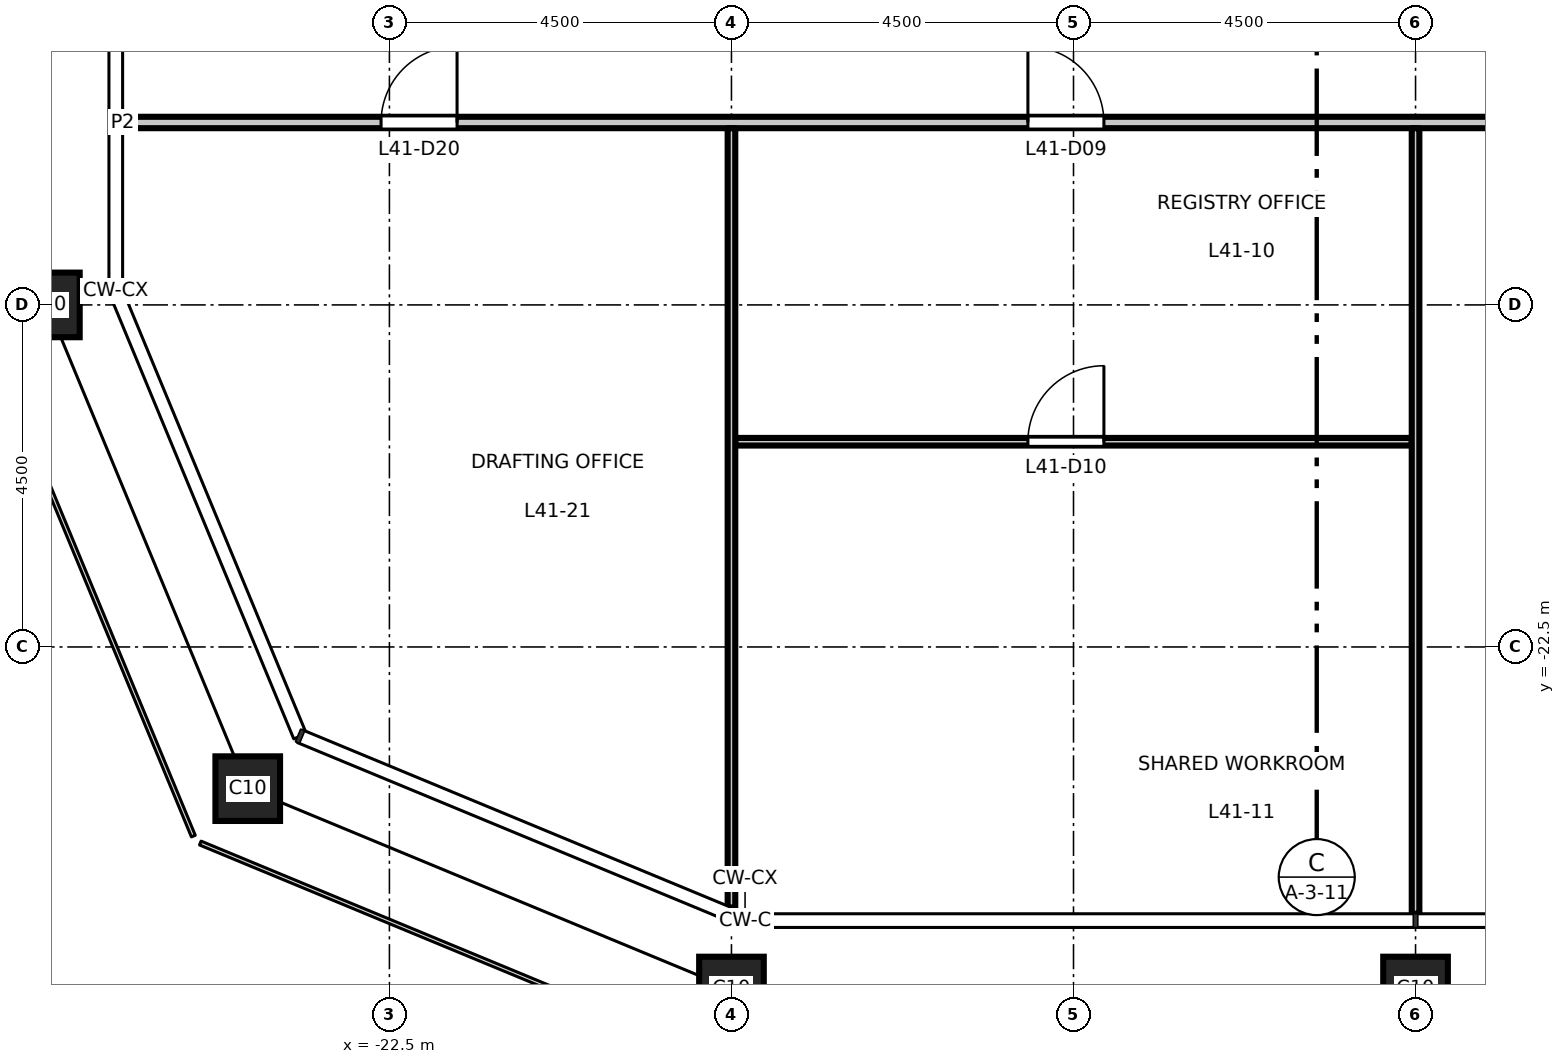
"""IFC4 building model, lengths in metres.
Left out: names, types, materials, properties, quantities, classifications, styles, units other than length and angle.
Written with IfcOpenShell. Run it as: python <this file> out.ifc"""

import sys

from ifc_helpers import new_model, si_unit, direction, frame, frame_2d, origin, origin_2d, place, context, subcontext, project, spatial, rectangle, hollow_rectangle, extrude, element, fill, save


model = new_model("IFC4")
c1 = context("Model", 3, precision=1e-05, world=origin(), true_north=direction((0.0, 1.0)))
c2 = subcontext(c1, "Body", "Model", "MODEL_VIEW")
j1 = project(units=[si_unit("LENGTHUNIT", "METRE"), si_unit("PLANEANGLEUNIT", "RADIAN")], contexts=[c1])
p1 = place(None, origin())
s1 = spatial("IfcSite", under=j1, at=p1, CompositionType="ELEMENT")
p2 = place(p1, origin())
s2 = spatial("IfcBuilding", under=s1, at=p2, CompositionType="ELEMENT")
p3 = place(p2, frame((0.0, 0.0, 192.7)))
s3 = spatial("IfcBuildingStorey", under=s2, at=p3, CompositionType="ELEMENT", Elevation=192.7)
for number, where, z_axis, x_axis in (
    (1, (-18.0, -27.0, 0.0), (0.0, 0.0, 1.0), (1.0, 0.0, 0.0)),
    (2, (-9.0, -27.0, 0.0), (0.0, 0.0, 1.0), (1.0, 0.0, 0.0)),
    (3, (-27.0, -18.0, 0.0), (0.0, 0.0, 1.0), (1.0, 0.0, 0.0)),
    (4, (-24.364, -24.364, 0.0), (0.0, 0.0, 1.0), (1.0, 0.0, 0.0)),
):
    element("IfcColumn", number, at=place(p3, frame(where, z_axis=z_axis, x_axis=x_axis)), inside=s3, PredefinedType="COLUMN", context=c2, shape_type="SweptSolid", body=[
        extrude(hollow_rectangle(XDim=0.85, YDim=0.85, WallThickness=0.05, at=origin_2d()), origin(), (0.0, 0.0, 1.0), 4.5),
    ])
p4 = place(p3, frame((-17.95, -19.8, 0.0), z_axis=(0.0, 0.0, 1.0), x_axis=(1.0, 0.0, 0.0)))
e5 = element("IfcWall", 5, at=p4, inside=s3, PredefinedType="PARTITIONING", context=c2, shape_type="SweptSolid", body=[
    extrude(rectangle(XDim=8.9, YDim=0.1, at=frame_2d((4.45, 0.0))), origin(), (0.0, 0.0, 1.0), 4.35),
])
p5 = place(p4, frame((3.85, 0.0, 0.0)))
e6 = element("IfcOpeningElement", 6, at=p5, cuts=e5, PredefinedType="OPENING", context=c2, shape_type="SweptSolid", body=[
    extrude(rectangle(XDim=1.0, YDim=2.1, at=frame_2d((0.5, 1.05))), frame((0.0, 0.06, 0.0), z_axis=(0.0, -1.0, 0.0), x_axis=(1.0, 0.0, 0.0)), (0.0, 0.0, 1.0), 0.12),
])
p6 = place(p3, frame((-26.01, -15.6, 0.0), z_axis=(0.0, 0.0, 1.0), x_axis=(1.0, 0.0, 0.0)))
e7 = element("IfcWall", 7, at=p6, inside=s3, PredefinedType="PARTITIONING", context=c2, shape_type="SweptSolid", body=[
    extrude(rectangle(XDim=52.02, YDim=0.15, at=frame_2d((26.01, 0.0))), origin(), (0.0, 0.0, 1.0), 4.35),
])
p7 = place(p6, frame((11.91, 0.0, 0.0)))
e8 = element("IfcOpeningElement", 8, at=p7, cuts=e7, PredefinedType="OPENING", context=c2, shape_type="SweptSolid", body=[
    extrude(rectangle(XDim=1.0, YDim=2.1, at=frame_2d((0.5, 1.05))), frame((0.0, 0.085, 0.0), z_axis=(0.0, -1.0, 0.0), x_axis=(1.0, 0.0, 0.0)), (0.0, 0.0, 1.0), 0.17),
])
p8 = place(p6, frame((20.91, 0.0, 0.0)))
e9 = element("IfcOpeningElement", 9, at=p8, cuts=e7, PredefinedType="OPENING", context=c2, shape_type="SweptSolid", body=[
    extrude(rectangle(XDim=1.0, YDim=2.1, at=frame_2d((0.5, 1.05))), frame((0.0, 0.085, 0.0), z_axis=(0.0, -1.0, 0.0), x_axis=(1.0, 0.0, 0.0)), (0.0, 0.0, 1.0), 0.17),
])
p9 = place(p6, frame((29.91, 0.0, 0.0)))
e10 = element("IfcOpeningElement", 10, at=p9, cuts=e7, PredefinedType="OPENING", context=c2, shape_type="SweptSolid", body=[
    extrude(rectangle(XDim=1.0, YDim=2.1, at=frame_2d((0.5, 1.05))), frame((0.0, 0.085, 0.0), z_axis=(0.0, -1.0, 0.0), x_axis=(1.0, 0.0, 0.0)), (0.0, 0.0, 1.0), 0.17),
])
p10 = place(p6, frame((38.91, 0.0, 0.0)))
e11 = element("IfcOpeningElement", 11, at=p10, cuts=e7, PredefinedType="OPENING", context=c2, shape_type="SweptSolid", body=[
    extrude(rectangle(XDim=1.0, YDim=2.1, at=frame_2d((0.5, 1.05))), frame((0.0, 0.085, 0.0), z_axis=(0.0, -1.0, 0.0), x_axis=(1.0, 0.0, 0.0)), (0.0, 0.0, 1.0), 0.17),
])
p11 = place(p6, frame((3.4, 0.0, 0.0)))
e12 = element("IfcOpeningElement", 12, at=p11, cuts=e7, PredefinedType="OPENING", context=c2, shape_type="SweptSolid", body=[
    extrude(rectangle(XDim=1.0, YDim=2.1, at=frame_2d((0.5, 1.05))), frame((0.0, 0.085, 0.0), z_axis=(0.0, -1.0, 0.0), x_axis=(1.0, 0.0, 0.0)), (0.0, 0.0, 1.0), 0.17),
])
p12 = place(p6, frame((47.41, 0.0, 0.0)))
e13 = element("IfcOpeningElement", 13, at=p12, cuts=e7, PredefinedType="OPENING", context=c2, shape_type="SweptSolid", body=[
    extrude(rectangle(XDim=1.0, YDim=2.1, at=frame_2d((0.5, 1.05))), frame((0.0, 0.085, 0.0), z_axis=(0.0, -1.0, 0.0), x_axis=(1.0, 0.0, 0.0)), (0.0, 0.0, 1.0), 0.17),
])
p13 = place(p3, frame((-18.0, -25.928, 0.0), z_axis=(0.0, 0.0, 1.0), x_axis=(0.0, 1.0, 0.0)))
e14 = element("IfcWall", 14, at=p13, inside=s3, PredefinedType="PARTITIONING", context=c2, shape_type="SweptSolid", body=[
    extrude(rectangle(XDim=10.253, YDim=0.1, at=frame_2d((5.126, 0.0))), origin(), (0.0, 0.0, 1.0), 3.65),
])
p14 = place(p3, frame((-9.0, -26.01, 0.0), z_axis=(0.0, 0.0, 1.0), x_axis=(0.0, 1.0, 0.0)))
e15 = element("IfcWall", 15, at=p14, inside=s3, PredefinedType="PARTITIONING", context=c2, shape_type="SweptSolid", body=[
    extrude(rectangle(XDim=10.335, YDim=0.1, at=frame_2d((5.167, 0.0))), origin(), (0.0, 0.0, 1.0), 3.65),
])
p15 = place(p7, origin())
e16 = element("IfcDoor", 16, at=p15, inside=s3, OperationType="SINGLE_SWING_LEFT", PredefinedType="DOOR", context=c2, shape_type="SweptSolid", body=[
    extrude(rectangle(XDim=1.0, YDim=2.1, at=frame_2d((0.5, 1.05))), frame((0.0, 0.025, 0.0), z_axis=(0.0, -1.0, 0.0), x_axis=(1.0, 0.0, 0.0)), (0.0, 0.0, 1.0), 0.05),
])
fill(e8, e16)
p16 = place(p5, origin())
e17 = element("IfcDoor", 17, at=p16, inside=s3, OperationType="SINGLE_SWING_RIGHT", PredefinedType="DOOR", context=c2, shape_type="SweptSolid", body=[
    extrude(rectangle(XDim=1.0, YDim=2.1, at=frame_2d((0.5, 1.05))), frame((0.0, 0.025, 0.0), z_axis=(0.0, -1.0, 0.0), x_axis=(1.0, 0.0, 0.0)), (0.0, 0.0, 1.0), 0.05),
])
fill(e6, e17)
p17 = place(p11, origin())
e18 = element("IfcDoor", 18, at=p17, inside=s3, OperationType="SINGLE_SWING_RIGHT", PredefinedType="DOOR", context=c2, shape_type="SweptSolid", body=[
    extrude(rectangle(XDim=1.0, YDim=2.1, at=frame_2d((0.5, 1.05))), frame((0.0, 0.025, 0.0), z_axis=(0.0, -1.0, 0.0), x_axis=(1.0, 0.0, 0.0)), (0.0, 0.0, 1.0), 0.05),
])
fill(e12, e18)
save(model, sys.argv[1])
